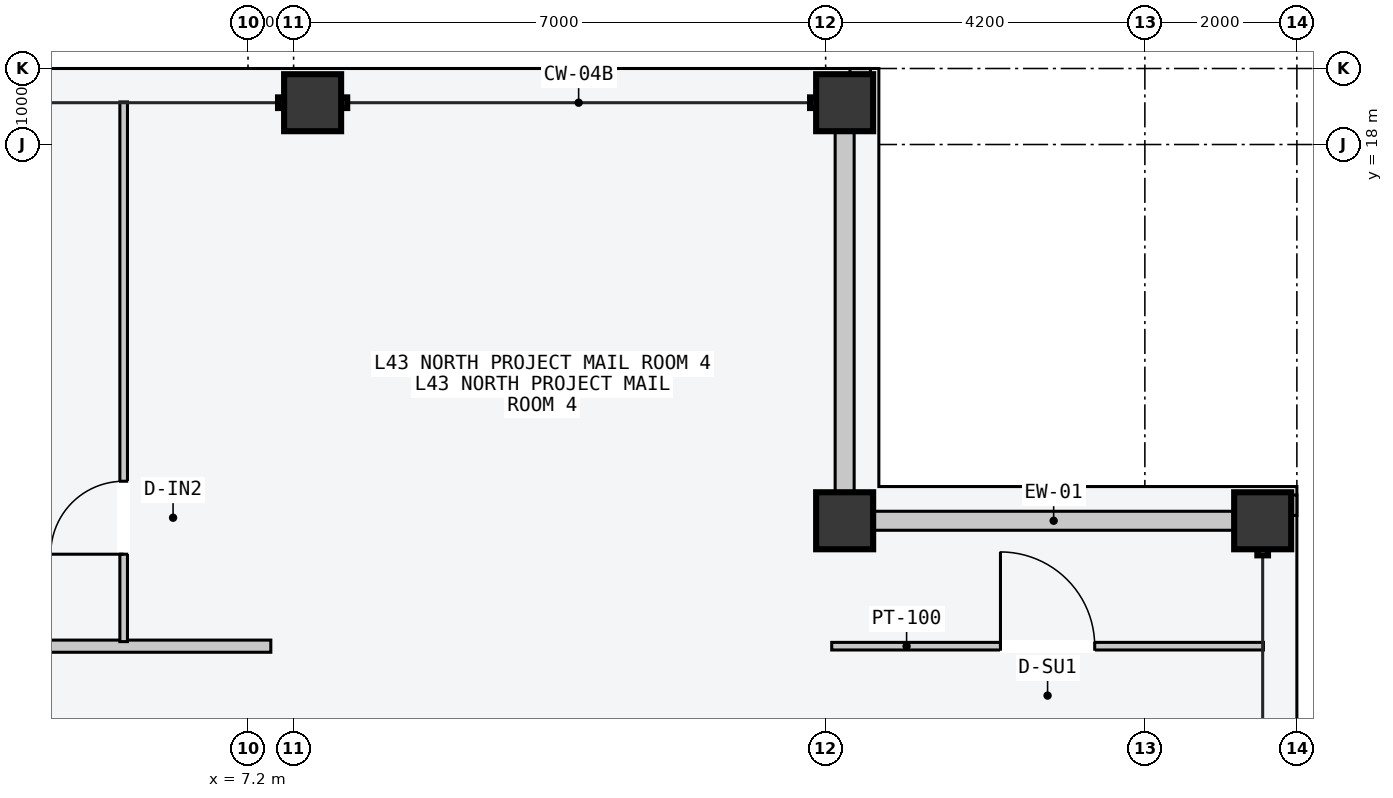
"""IFC4 building model, lengths in metres.
Left out: names, types, materials, properties, quantities, classifications, styles, units other than length and angle.
Written with IfcOpenShell. Run it as: python <this file> out.ifc"""

import sys

from ifc_helpers import new_model, si_unit, direction, frame, frame_2d, origin, origin_2d, place, context, subcontext, project, spatial, rectangle, hollow_rectangle, extrude, element, fill, save


model = new_model("IFC4")
c1 = context("Model", 3, precision=1e-05, world=origin(), true_north=direction((0.0, 1.0)))
c2 = subcontext(c1, "Body", "Model", "MODEL_VIEW")
j1 = project(units=[si_unit("LENGTHUNIT", "METRE"), si_unit("PLANEANGLEUNIT", "RADIAN")], contexts=[c1])
p1 = place(None, origin())
s1 = spatial("IfcSite", under=j1, at=p1, CompositionType="ELEMENT")
p2 = place(p1, origin())
s2 = spatial("IfcBuilding", under=s1, at=p2, CompositionType="ELEMENT")
p3 = place(p2, frame((0.0, 0.0, 165.9)))
s3 = spatial("IfcBuildingStorey", under=s2, at=p3, CompositionType="ELEMENT", Elevation=165.9)
for number, where, z_axis, x_axis in (
    (1, (8.05, 18.55, 0.0), (0.0, 0.0, 1.0), (1.0, 0.0, 0.0)),
    (2, (15.05, 18.55, 0.0), (0.0, 0.0, 1.0), (1.0, 0.0, 0.0)),
    (3, (20.55, 13.05, 0.0), (0.0, 0.0, 1.0), (0.0, 1.0, 0.0)),
    (4, (15.05, 13.05, 0.0), (0.0, 0.0, 1.0), (1.0, 0.0, 0.0)),
):
    element("IfcColumn", number, at=place(p3, frame(where, z_axis=z_axis, x_axis=x_axis)), inside=s3, PredefinedType="COLUMN", context=c2, shape_type="SweptSolid", body=[
        extrude(hollow_rectangle(XDim=0.75, YDim=0.75, WallThickness=0.032, at=origin_2d()), origin(), (0.0, 0.0, 1.0), 3.6),
    ])
for number, where, z_axis, x_axis in (
    (5, (15.435, 13.05, 0.0), (0.0, 0.0, 1.0), (1.0, 0.0, 0.0)),
    (6, (15.05, 13.435, 0.0), (0.0, 0.0, 1.0), (0.0, 1.0, 0.0)),
):
    element("IfcWall", number, at=place(p3, frame(where, z_axis=z_axis, x_axis=x_axis)), inside=s3, PredefinedType="STANDARD", context=c2, shape_type="SweptSolid", body=[
        extrude(rectangle(XDim=4.73, YDim=0.25, at=frame_2d((2.365, 0.0))), origin(), (0.0, 0.0, 1.0), 2.75),
    ])
for number, where, z_axis, x_axis in (
    (7, (15.12, 18.89, 0.0), (0.0, 0.0, 1.0), (1.0, 0.0, 0.0)),
    (8, (20.89, 13.12, 0.0), (0.0, 0.0, 1.0), (0.0, 1.0, 0.0)),
):
    element("IfcWall", number, at=place(p3, frame(where, z_axis=z_axis, x_axis=x_axis)), inside=s3, PredefinedType="PARAPET", context=c2, shape_type="SweptSolid", body=[
        extrude(rectangle(XDim=0.27, YDim=0.22, at=frame_2d((0.135, 0.0))), origin(), (0.0, 0.0, 1.0), 1.2),
    ])
p4 = place(p3, frame((1.26, 11.4, 0.0), z_axis=(0.0, 0.0, 1.0), x_axis=(1.0, 0.0, 0.0)))
e9 = element("IfcWall", 9, at=p4, inside=s3, PredefinedType="PARTITIONING", context=c2, shape_type="SweptSolid", body=[
    extrude(rectangle(XDim=6.24, YDim=0.16, at=frame_2d((3.12, 0.0))), origin(), (0.0, 0.0, 1.0), 3.4),
])
p5 = place(p3, frame((5.564, 11.46, 0.0), z_axis=(0.0, 0.0, 1.0), x_axis=(0.0, 1.0, 0.0)))
e10 = element("IfcWall", 10, at=p5, inside=s3, PredefinedType="PARTITIONING", context=c2, shape_type="SweptSolid", body=[
    extrude(rectangle(XDim=7.1, YDim=0.1, at=frame_2d((3.55, 0.0))), origin(), (0.0, 0.0, 1.0), 3.4),
])
p6 = place(p5, frame((1.15, 0.0, 0.0)))
e11 = element("IfcOpeningElement", 11, at=p6, cuts=e10, PredefinedType="OPENING", context=c2, shape_type="SweptSolid", body=[
    extrude(rectangle(XDim=0.96, YDim=2.18, at=frame_2d((0.48, 1.09))), frame((0.0, 0.06, 0.0), z_axis=(0.0, -1.0, 0.0), x_axis=(1.0, 0.0, 0.0)), (0.0, 0.0, 1.0), 0.12),
])
p7 = place(p3, frame((14.88, 11.4, 0.0), z_axis=(0.0, 0.0, 1.0), x_axis=(1.0, 0.0, 0.0)))
e12 = element("IfcWall", 12, at=p7, inside=s3, PredefinedType="PARTITIONING", context=c2, shape_type="SweptSolid", body=[
    extrude(rectangle(XDim=5.68, YDim=0.1, at=frame_2d((2.84, 0.0))), origin(), (0.0, 0.0, 1.0), 3.4),
])
p8 = place(p7, frame((2.22, 0.0, 0.0)))
e13 = element("IfcOpeningElement", 13, at=p8, cuts=e12, PredefinedType="OPENING", context=c2, shape_type="SweptSolid", body=[
    extrude(rectangle(XDim=1.24, YDim=2.24, at=frame_2d((0.62, 1.12))), frame((0.0, 0.06, 0.0), z_axis=(0.0, -1.0, 0.0), x_axis=(1.0, 0.0, 0.0)), (0.0, 0.0, 1.0), 0.12),
])
p9 = place(p6, origin())
e14 = element("IfcDoor", 14, at=p9, inside=s3, OperationType="SINGLE_SWING_LEFT", PredefinedType="DOOR", context=c2, shape_type="SweptSolid", body=[
    extrude(rectangle(XDim=0.96, YDim=2.18, at=frame_2d((0.48, 1.09))), frame((0.0, 0.025, 0.0), z_axis=(0.0, -1.0, 0.0), x_axis=(1.0, 0.0, 0.0)), (0.0, 0.0, 1.0), 0.05),
])
fill(e11, e14)
p10 = place(p8, origin())
e15 = element("IfcDoor", 15, at=p10, inside=s3, OperationType="SINGLE_SWING_LEFT", PredefinedType="DOOR", context=c2, shape_type="SweptSolid", body=[
    extrude(rectangle(XDim=1.24, YDim=2.24, at=frame_2d((0.62, 1.12))), frame((0.0, 0.025, 0.0), z_axis=(0.0, -1.0, 0.0), x_axis=(1.0, 0.0, 0.0)), (0.0, 0.0, 1.0), 0.05),
])
fill(e13, e15)
save(model, sys.argv[1])
